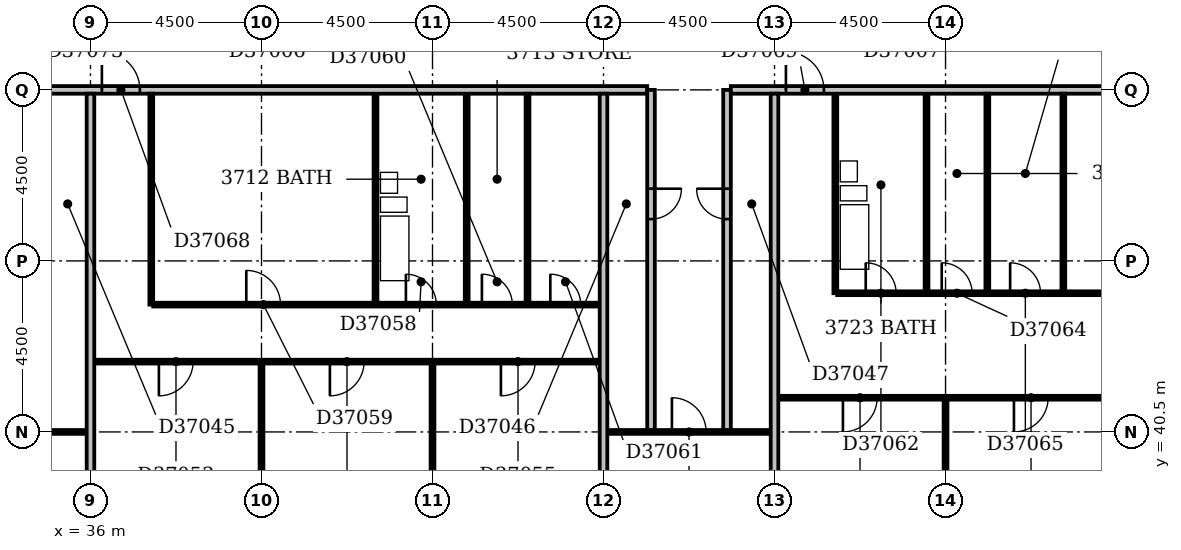
"""IFC4 building model, lengths in metres.
Left out: names, types, materials, properties, quantities, classifications, styles, units other than length and angle.
Written with IfcOpenShell. Run it as: python <this file> out.ifc"""

import sys

from ifc_helpers import new_model, si_unit, direction, frame, frame_2d, origin, place, context, subcontext, project, spatial, rectangle, extrude, element, fill, save


model = new_model("IFC4")
c1 = context("Model", 3, precision=1e-05, world=origin(), true_north=direction((0.0, 1.0)))
c2 = subcontext(c1, "Body", "Model", "MODEL_VIEW")
j1 = project(units=[si_unit("LENGTHUNIT", "METRE"), si_unit("PLANEANGLEUNIT", "RADIAN")], contexts=[c1])
p1 = place(None, origin())
s1 = spatial("IfcSite", under=j1, at=p1, CompositionType="ELEMENT")
p2 = place(p1, origin())
s2 = spatial("IfcBuilding", under=s1, at=p2, CompositionType="ELEMENT")
p3 = place(p2, frame((0.0, 0.0, 148.4)))
s3 = spatial("IfcBuildingStorey", under=s2, at=p3, CompositionType="ELEMENT", Elevation=148.4)
p4 = place(p3, frame((36.0, 36.5, 0.0), z_axis=(0.0, 0.0, 1.0), x_axis=(0.0, 1.0, 0.0)))
e1 = element("IfcWall", 1, at=p4, inside=s3, PredefinedType="PARTITIONING", context=c2, shape_type="SweptSolid", body=[
    extrude(rectangle(XDim=12.9, YDim=0.2, at=frame_2d((6.45, 0.0))), origin(), (0.0, 0.0, 1.0), 2.4),
])
p5 = place(p3, frame((40.5, 36.5, 0.0), z_axis=(0.0, 0.0, 1.0), x_axis=(0.0, 1.0, 0.0)))
e2 = element("IfcWall", 2, at=p5, inside=s3, PredefinedType="PARTITIONING", context=c2, shape_type="SweptSolid", body=[
    extrude(rectangle(XDim=5.8, YDim=0.1, at=frame_2d((2.9, 0.0))), origin(), (0.0, 0.0, 1.0), 3.3),
])
p6 = place(p3, frame((45.0, 36.5, 0.0), z_axis=(0.0, 0.0, 1.0), x_axis=(0.0, 1.0, 0.0)))
e3 = element("IfcWall", 3, at=p6, inside=s3, PredefinedType="PARTITIONING", context=c2, shape_type="SweptSolid", body=[
    extrude(rectangle(XDim=5.8, YDim=0.1, at=frame_2d((2.9, 0.0))), origin(), (0.0, 0.0, 1.0), 2.6),
])
p7 = place(p3, frame((49.5, 36.5, 0.0), z_axis=(0.0, 0.0, 1.0), x_axis=(0.0, 1.0, 0.0)))
e4 = element("IfcWall", 4, at=p7, inside=s3, PredefinedType="PARTITIONING", context=c2, shape_type="SweptSolid", body=[
    extrude(rectangle(XDim=12.9, YDim=0.2, at=frame_2d((6.45, 0.0))), origin(), (0.0, 0.0, 1.0), 3.3),
])
p8 = place(p3, frame((54.0, 36.5, 0.0), z_axis=(0.0, 0.0, 1.0), x_axis=(0.0, 1.0, 0.0)))
e5 = element("IfcWall", 5, at=p8, inside=s3, PredefinedType="PARTITIONING", context=c2, shape_type="SweptSolid", body=[
    extrude(rectangle(XDim=12.9, YDim=0.2, at=frame_2d((6.45, 0.0))), origin(), (0.0, 0.0, 1.0), 2.6),
])
p9 = place(p3, frame((58.5, 36.5, 0.0), z_axis=(0.0, 0.0, 1.0), x_axis=(0.0, 1.0, 0.0)))
e6 = element("IfcWall", 6, at=p9, inside=s3, PredefinedType="PARTITIONING", context=c2, shape_type="SweptSolid", body=[
    extrude(rectangle(XDim=4.85, YDim=0.1, at=frame_2d((2.425, 0.0))), origin(), (0.0, 0.0, 1.0), 3.3),
])
p10 = place(p3, frame((31.6, 40.5, 0.0), z_axis=(0.0, 0.0, 1.0), x_axis=(1.0, 0.0, 0.0)))
e7 = element("IfcWall", 7, at=p10, inside=s3, PredefinedType="PARTITIONING", context=c2, shape_type="SweptSolid", body=[
    extrude(rectangle(XDim=4.3, YDim=0.1, at=frame_2d((2.15, 0.0))), origin(), (0.0, 0.0, 1.0), 3.3),
])
p11 = place(p10, frame((1.7, 0.0, 0.0)))
e8 = element("IfcOpeningElement", 8, at=p11, cuts=e7, PredefinedType="OPENING", context=c2, shape_type="SweptSolid", body=[
    extrude(rectangle(XDim=0.9, YDim=2.1, at=frame_2d((0.45, 1.05))), frame((0.0, 0.062, 0.0), z_axis=(0.0, -1.0, 0.0), x_axis=(1.0, 0.0, 0.0)), (0.0, 0.0, 1.0), 0.124),
])
p12 = place(p3, frame((49.6, 40.5, 0.0), z_axis=(0.0, 0.0, 1.0), x_axis=(1.0, 0.0, 0.0)))
e9 = element("IfcWall", 9, at=p12, inside=s3, PredefinedType="PARTITIONING", context=c2, shape_type="SweptSolid", body=[
    extrude(rectangle(XDim=4.3, YDim=0.1, at=frame_2d((2.15, 0.0))), origin(), (0.0, 0.0, 1.0), 3.3),
])
p13 = place(p12, frame((1.7, 0.0, 0.0)))
e10 = element("IfcOpeningElement", 10, at=p13, cuts=e9, PredefinedType="OPENING", context=c2, shape_type="SweptSolid", body=[
    extrude(rectangle(XDim=0.9, YDim=2.1, at=frame_2d((0.45, 1.05))), frame((0.0, 0.062, 0.0), z_axis=(0.0, -1.0, 0.0), x_axis=(1.0, 0.0, 0.0)), (0.0, 0.0, 1.0), 0.124),
])
p14 = place(p3, frame((50.75, 40.55, 0.0), z_axis=(0.0, 0.0, 1.0), x_axis=(0.0, 1.0, 0.0)))
e11 = element("IfcWall", 11, at=p14, inside=s3, PredefinedType="PARTITIONING", context=c2, shape_type="SweptSolid", body=[
    extrude(rectangle(XDim=8.95, YDim=0.2, at=frame_2d((4.475, 0.0))), origin(), (0.0, 0.0, 1.0), 3.3),
])
p15 = place(p14, frame((5.55, 0.0, 0.0)))
e12 = element("IfcOpeningElement", 12, at=p15, cuts=e11, PredefinedType="OPENING", context=c2, shape_type="SweptSolid", body=[
    extrude(rectangle(XDim=0.8, YDim=2.1, at=frame_2d((0.4, 1.05))), frame((0.0, 0.112, 0.0), z_axis=(0.0, -1.0, 0.0), x_axis=(1.0, 0.0, 0.0)), (0.0, 0.0, 1.0), 0.224),
])
p16 = place(p3, frame((52.75, 40.55, 0.0), z_axis=(0.0, 0.0, 1.0), x_axis=(0.0, 1.0, 0.0)))
e13 = element("IfcWall", 13, at=p16, inside=s3, PredefinedType="PARTITIONING", context=c2, shape_type="SweptSolid", body=[
    extrude(rectangle(XDim=8.95, YDim=0.2, at=frame_2d((4.475, 0.0))), origin(), (0.0, 0.0, 1.0), 3.3),
])
p17 = place(p16, frame((5.55, 0.0, 0.0)))
e14 = element("IfcOpeningElement", 14, at=p17, cuts=e13, PredefinedType="OPENING", context=c2, shape_type="SweptSolid", body=[
    extrude(rectangle(XDim=0.8, YDim=2.1, at=frame_2d((0.4, 1.05))), frame((0.0, 0.112, 0.0), z_axis=(0.0, -1.0, 0.0), x_axis=(1.0, 0.0, 0.0)), (0.0, 0.0, 1.0), 0.224),
])
p18 = place(p3, frame((54.1, 41.4, 0.0), z_axis=(0.0, 0.0, 1.0), x_axis=(1.0, 0.0, 0.0)))
e15 = element("IfcWall", 15, at=p18, inside=s3, PredefinedType="PARTITIONING", context=c2, shape_type="SweptSolid", body=[
    extrude(rectangle(XDim=14.0, YDim=0.1, at=frame_2d((7.0, 0.0))), origin(), (0.0, 0.0, 1.0), 3.3),
])
p19 = place(p18, frame((1.7, 0.0, 0.0)))
e16 = element("IfcOpeningElement", 16, at=p19, cuts=e15, PredefinedType="OPENING", context=c2, shape_type="SweptSolid", body=[
    extrude(rectangle(XDim=0.9, YDim=2.1, at=frame_2d((0.45, 1.05))), frame((0.0, 0.062, 0.0), z_axis=(0.0, -1.0, 0.0), x_axis=(1.0, 0.0, 0.0)), (0.0, 0.0, 1.0), 0.124),
])
p20 = place(p18, frame((6.2, 0.0, 0.0)))
e17 = element("IfcOpeningElement", 17, at=p20, cuts=e15, PredefinedType="OPENING", context=c2, shape_type="SweptSolid", body=[
    extrude(rectangle(XDim=0.9, YDim=2.1, at=frame_2d((0.45, 1.05))), frame((0.0, 0.062, 0.0), z_axis=(0.0, -1.0, 0.0), x_axis=(1.0, 0.0, 0.0)), (0.0, 0.0, 1.0), 0.124),
])
p21 = place(p18, frame((10.7, 0.0, 0.0)))
e18 = element("IfcOpeningElement", 18, at=p21, cuts=e15, PredefinedType="OPENING", context=c2, shape_type="SweptSolid", body=[
    extrude(rectangle(XDim=0.9, YDim=2.1, at=frame_2d((0.45, 1.05))), frame((0.0, 0.062, 0.0), z_axis=(0.0, -1.0, 0.0), x_axis=(1.0, 0.0, 0.0)), (0.0, 0.0, 1.0), 0.124),
])
p22 = place(p3, frame((36.1, 42.35, 0.0), z_axis=(0.0, 0.0, 1.0), x_axis=(1.0, 0.0, 0.0)))
e19 = element("IfcWall", 19, at=p22, inside=s3, PredefinedType="PARTITIONING", context=c2, shape_type="SweptSolid", body=[
    extrude(rectangle(XDim=13.3, YDim=0.1, at=frame_2d((6.65, 0.0))), origin(), (0.0, 0.0, 1.0), 3.3),
])
p23 = place(p22, frame((1.7, 0.0, 0.0)))
e20 = element("IfcOpeningElement", 20, at=p23, cuts=e19, PredefinedType="OPENING", context=c2, shape_type="SweptSolid", body=[
    extrude(rectangle(XDim=0.9, YDim=2.1, at=frame_2d((0.45, 1.05))), frame((0.0, 0.062, 0.0), z_axis=(0.0, -1.0, 0.0), x_axis=(1.0, 0.0, 0.0)), (0.0, 0.0, 1.0), 0.124),
])
p24 = place(p22, frame((6.2, 0.0, 0.0)))
e21 = element("IfcOpeningElement", 21, at=p24, cuts=e19, PredefinedType="OPENING", context=c2, shape_type="SweptSolid", body=[
    extrude(rectangle(XDim=0.9, YDim=2.1, at=frame_2d((0.45, 1.05))), frame((0.0, 0.062, 0.0), z_axis=(0.0, -1.0, 0.0), x_axis=(1.0, 0.0, 0.0)), (0.0, 0.0, 1.0), 0.124),
])
p25 = place(p22, frame((10.7, 0.0, 0.0)))
e22 = element("IfcOpeningElement", 22, at=p25, cuts=e19, PredefinedType="OPENING", context=c2, shape_type="SweptSolid", body=[
    extrude(rectangle(XDim=0.9, YDim=2.1, at=frame_2d((0.45, 1.05))), frame((0.0, 0.062, 0.0), z_axis=(0.0, -1.0, 0.0), x_axis=(1.0, 0.0, 0.0)), (0.0, 0.0, 1.0), 0.124),
])
p26 = place(p3, frame((37.6, 43.85, 0.0), z_axis=(0.0, 0.0, 1.0), x_axis=(0.0, 1.0, 0.0)))
e23 = element("IfcWall", 23, at=p26, inside=s3, PredefinedType="PARTITIONING", context=c2, shape_type="SweptSolid", body=[
    extrude(rectangle(XDim=5.55, YDim=0.1, at=frame_2d((2.775, 0.0))), origin(), (0.0, 0.0, 1.0), 3.3),
])
p27 = place(p3, frame((37.65, 43.85, 0.0), z_axis=(0.0, 0.0, 1.0), x_axis=(1.0, 0.0, 0.0)))
e24 = element("IfcWall", 24, at=p27, inside=s3, PredefinedType="PARTITIONING", context=c2, shape_type="SweptSolid", body=[
    extrude(rectangle(XDim=11.75, YDim=0.1, at=frame_2d((5.875, 0.0))), origin(), (0.0, 0.0, 1.0), 3.3),
])
p28 = place(p27, frame((6.65, 0.0, 0.0)))
e25 = element("IfcOpeningElement", 25, at=p28, cuts=e24, PredefinedType="OPENING", context=c2, shape_type="SweptSolid", body=[
    extrude(rectangle(XDim=0.8, YDim=2.1, at=frame_2d((0.4, 1.05))), frame((0.0, 0.062, 0.0), z_axis=(0.0, -1.0, 0.0), x_axis=(1.0, 0.0, 0.0)), (0.0, 0.0, 1.0), 0.124),
])
p29 = place(p27, frame((2.45, 0.0, 0.0)))
e26 = element("IfcOpeningElement", 26, at=p29, cuts=e24, PredefinedType="OPENING", context=c2, shape_type="SweptSolid", body=[
    extrude(rectangle(XDim=0.9, YDim=2.1, at=frame_2d((0.45, 1.05))), frame((0.0, 0.062, 0.0), z_axis=(0.0, -1.0, 0.0), x_axis=(1.0, 0.0, 0.0)), (0.0, 0.0, 1.0), 0.124),
])
p30 = place(p27, frame((8.65, 0.0, 0.0)))
e27 = element("IfcOpeningElement", 27, at=p30, cuts=e24, PredefinedType="OPENING", context=c2, shape_type="SweptSolid", body=[
    extrude(rectangle(XDim=0.8, YDim=2.1, at=frame_2d((0.4, 1.05))), frame((0.0, 0.062, 0.0), z_axis=(0.0, -1.0, 0.0), x_axis=(1.0, 0.0, 0.0)), (0.0, 0.0, 1.0), 0.124),
])
p31 = place(p27, frame((10.45, 0.0, 0.0)))
e28 = element("IfcOpeningElement", 28, at=p31, cuts=e24, PredefinedType="OPENING", context=c2, shape_type="SweptSolid", body=[
    extrude(rectangle(XDim=0.8, YDim=2.1, at=frame_2d((0.4, 1.05))), frame((0.0, 0.062, 0.0), z_axis=(0.0, -1.0, 0.0), x_axis=(1.0, 0.0, 0.0)), (0.0, 0.0, 1.0), 0.124),
])
for number, where, z_axis, x_axis in (
    (29, (43.5, 43.9, 0.0), (0.0, 0.0, 1.0), (0.0, 1.0, 0.0)),
    (30, (45.9, 43.9, 0.0), (0.0, 0.0, 1.0), (0.0, 1.0, 0.0)),
):
    element("IfcWall", number, at=place(p3, frame(where, z_axis=z_axis, x_axis=x_axis)), inside=s3, PredefinedType="PLUMBINGWALL", context=c2, shape_type="SweptSolid", body=[
        extrude(rectangle(XDim=5.5, YDim=0.1, at=frame_2d((2.75, 0.0))), origin(), (0.0, 0.0, 1.0), 3.3),
    ])
p32 = place(p3, frame((47.5, 43.9, 0.0), z_axis=(0.0, 0.0, 1.0), x_axis=(0.0, 1.0, 0.0)))
e31 = element("IfcWall", 31, at=p32, inside=s3, PredefinedType="PARTITIONING", context=c2, shape_type="SweptSolid", body=[
    extrude(rectangle(XDim=5.5, YDim=0.1, at=frame_2d((2.75, 0.0))), origin(), (0.0, 0.0, 1.0), 3.3),
])
p33 = place(p3, frame((55.6, 44.15, 0.0), z_axis=(0.0, 0.0, 1.0), x_axis=(0.0, 1.0, 0.0)))
e32 = element("IfcWall", 32, at=p33, inside=s3, PredefinedType="PLUMBINGWALL", context=c2, shape_type="SweptSolid", body=[
    extrude(rectangle(XDim=5.25, YDim=0.1, at=frame_2d((2.625, 0.0))), origin(), (0.0, 0.0, 1.0), 3.3),
])
p34 = place(p3, frame((55.65, 44.15, 0.0), z_axis=(0.0, 0.0, 1.0), x_axis=(1.0, 0.0, 0.0)))
e33 = element("IfcWall", 33, at=p34, inside=s3, PredefinedType="PARTITIONING", context=c2, shape_type="SweptSolid", body=[
    extrude(rectangle(XDim=12.45, YDim=0.1, at=frame_2d((6.225, 0.0))), origin(), (0.0, 0.0, 1.0), 3.3),
])
p35 = place(p34, frame((0.75, 0.0, 0.0)))
e34 = element("IfcOpeningElement", 34, at=p35, cuts=e33, PredefinedType="OPENING", context=c2, shape_type="SweptSolid", body=[
    extrude(rectangle(XDim=0.8, YDim=2.1, at=frame_2d((0.4, 1.05))), frame((0.0, 0.062, 0.0), z_axis=(0.0, -1.0, 0.0), x_axis=(1.0, 0.0, 0.0)), (0.0, 0.0, 1.0), 0.124),
])
p36 = place(p34, frame((8.45, 0.0, 0.0)))
e35 = element("IfcOpeningElement", 35, at=p36, cuts=e33, PredefinedType="OPENING", context=c2, shape_type="SweptSolid", body=[
    extrude(rectangle(XDim=0.9, YDim=2.1, at=frame_2d((0.45, 1.05))), frame((0.0, 0.062, 0.0), z_axis=(0.0, -1.0, 0.0), x_axis=(1.0, 0.0, 0.0)), (0.0, 0.0, 1.0), 0.124),
])
p37 = place(p34, frame((2.75, 0.0, 0.0)))
e36 = element("IfcOpeningElement", 36, at=p37, cuts=e33, PredefinedType="OPENING", context=c2, shape_type="SweptSolid", body=[
    extrude(rectangle(XDim=0.8, YDim=2.1, at=frame_2d((0.4, 1.05))), frame((0.0, 0.062, 0.0), z_axis=(0.0, -1.0, 0.0), x_axis=(1.0, 0.0, 0.0)), (0.0, 0.0, 1.0), 0.124),
])
p38 = place(p34, frame((4.55, 0.0, 0.0)))
e37 = element("IfcOpeningElement", 37, at=p38, cuts=e33, PredefinedType="OPENING", context=c2, shape_type="SweptSolid", body=[
    extrude(rectangle(XDim=0.8, YDim=2.1, at=frame_2d((0.4, 1.05))), frame((0.0, 0.062, 0.0), z_axis=(0.0, -1.0, 0.0), x_axis=(1.0, 0.0, 0.0)), (0.0, 0.0, 1.0), 0.124),
])
p39 = place(p3, frame((58.0, 44.2, 0.0), z_axis=(0.0, 0.0, 1.0), x_axis=(0.0, 1.0, 0.0)))
e38 = element("IfcWall", 38, at=p39, inside=s3, PredefinedType="PLUMBINGWALL", context=c2, shape_type="SweptSolid", body=[
    extrude(rectangle(XDim=5.2, YDim=0.1, at=frame_2d((2.6, 0.0))), origin(), (0.0, 0.0, 1.0), 3.3),
])
for number, where, z_axis, x_axis in (
    (39, (59.6, 44.2, 0.0), (0.0, 0.0, 1.0), (0.0, 1.0, 0.0)),
    (40, (61.6, 44.2, 0.0), (0.0, 0.0, 1.0), (0.0, 1.0, 0.0)),
):
    element("IfcWall", number, at=place(p3, frame(where, z_axis=z_axis, x_axis=x_axis)), inside=s3, PredefinedType="PARTITIONING", context=c2, shape_type="SweptSolid", body=[
        extrude(rectangle(XDim=5.2, YDim=0.1, at=frame_2d((2.6, 0.0))), origin(), (0.0, 0.0, 1.0), 3.3),
    ])
p40 = place(p3, frame((34.85, 49.5, 0.0), z_axis=(0.0, 0.0, 1.0), x_axis=(1.0, 0.0, 0.0)))
e41 = element("IfcWall", 41, at=p40, inside=s3, PredefinedType="PARTITIONING", context=c2, shape_type="SweptSolid", body=[
    extrude(rectangle(XDim=15.8, YDim=0.2, at=frame_2d((7.9, 0.0))), origin(), (0.0, 0.0, 1.0), 3.3),
])
p41 = place(p40, frame((1.45, 0.0, 0.0)))
e42 = element("IfcOpeningElement", 42, at=p41, cuts=e41, PredefinedType="OPENING", context=c2, shape_type="SweptSolid", body=[
    extrude(rectangle(XDim=1.0, YDim=2.1, at=frame_2d((0.5, 1.05))), frame((0.0, 0.112, 0.0), z_axis=(0.0, -1.0, 0.0), x_axis=(1.0, 0.0, 0.0)), (0.0, 0.0, 1.0), 0.224),
])
p42 = place(p3, frame((52.85, 49.5, 0.0), z_axis=(0.0, 0.0, 1.0), x_axis=(1.0, 0.0, 0.0)))
e43 = element("IfcWall", 43, at=p42, inside=s3, PredefinedType="PARTITIONING", context=c2, shape_type="SweptSolid", body=[
    extrude(rectangle(XDim=14.15, YDim=0.2, at=frame_2d((7.075, 0.0))), origin(), (0.0, 0.0, 1.0), 3.3),
])
p43 = place(p42, frame((1.45, 0.0, 0.0)))
e44 = element("IfcOpeningElement", 44, at=p43, cuts=e43, PredefinedType="OPENING", context=c2, shape_type="SweptSolid", body=[
    extrude(rectangle(XDim=1.0, YDim=2.1, at=frame_2d((0.5, 1.05))), frame((0.0, 0.112, 0.0), z_axis=(0.0, -1.0, 0.0), x_axis=(1.0, 0.0, 0.0)), (0.0, 0.0, 1.0), 0.224),
])
p44 = place(p13, origin())
e45 = element("IfcDoor", 45, at=p44, inside=s3, OperationType="SINGLE_SWING_LEFT", PredefinedType="DOOR", context=c2, shape_type="SweptSolid", body=[
    extrude(rectangle(XDim=0.9, YDim=2.1, at=frame_2d((0.45, 1.05))), frame((0.0, 0.025, 0.0), z_axis=(0.0, -1.0, 0.0), x_axis=(1.0, 0.0, 0.0)), (0.0, 0.0, 1.0), 0.05),
])
fill(e10, e45)
p45 = place(p15, origin())
e46 = element("IfcDoor", 46, at=p45, inside=s3, OperationType="SINGLE_SWING_RIGHT", PredefinedType="DOOR", context=c2, shape_type="SweptSolid", body=[
    extrude(rectangle(XDim=0.8, YDim=2.1, at=frame_2d((0.4, 1.05))), frame((0.0, 0.025, 0.0), z_axis=(0.0, -1.0, 0.0), x_axis=(1.0, 0.0, 0.0)), (0.0, 0.0, 1.0), 0.05),
])
fill(e12, e46)
p46 = place(p17, frame((0.8, 0.0, 0.0), z_axis=(0.0, 0.0, 1.0), x_axis=(-1.0, 0.0, 0.0)))
e47 = element("IfcDoor", 47, at=p46, inside=s3, OperationType="SINGLE_SWING_LEFT", PredefinedType="DOOR", context=c2, shape_type="SweptSolid", body=[
    extrude(rectangle(XDim=0.8, YDim=2.1, at=frame_2d((0.4, 1.05))), frame((0.0, 0.025, 0.0), z_axis=(0.0, -1.0, 0.0), x_axis=(1.0, 0.0, 0.0)), (0.0, 0.0, 1.0), 0.05),
])
fill(e14, e47)
p47 = place(p19, frame((0.9, 0.0, 0.0), z_axis=(0.0, 0.0, 1.0), x_axis=(-1.0, 0.0, 0.0)))
e48 = element("IfcDoor", 48, at=p47, inside=s3, OperationType="SINGLE_SWING_RIGHT", PredefinedType="DOOR", context=c2, shape_type="SweptSolid", body=[
    extrude(rectangle(XDim=0.9, YDim=2.1, at=frame_2d((0.45, 1.05))), frame((0.0, 0.025, 0.0), z_axis=(0.0, -1.0, 0.0), x_axis=(1.0, 0.0, 0.0)), (0.0, 0.0, 1.0), 0.05),
])
fill(e16, e48)
p48 = place(p20, frame((0.9, 0.0, 0.0), z_axis=(0.0, 0.0, 1.0), x_axis=(-1.0, 0.0, 0.0)))
e49 = element("IfcDoor", 49, at=p48, inside=s3, OperationType="SINGLE_SWING_RIGHT", PredefinedType="DOOR", context=c2, shape_type="SweptSolid", body=[
    extrude(rectangle(XDim=0.9, YDim=2.1, at=frame_2d((0.45, 1.05))), frame((0.0, 0.025, 0.0), z_axis=(0.0, -1.0, 0.0), x_axis=(1.0, 0.0, 0.0)), (0.0, 0.0, 1.0), 0.05),
])
fill(e17, e49)
p49 = place(p23, frame((0.9, 0.0, 0.0), z_axis=(0.0, 0.0, 1.0), x_axis=(-1.0, 0.0, 0.0)))
e50 = element("IfcDoor", 50, at=p49, inside=s3, OperationType="SINGLE_SWING_RIGHT", PredefinedType="DOOR", context=c2, shape_type="SweptSolid", body=[
    extrude(rectangle(XDim=0.9, YDim=2.1, at=frame_2d((0.45, 1.05))), frame((0.0, 0.025, 0.0), z_axis=(0.0, -1.0, 0.0), x_axis=(1.0, 0.0, 0.0)), (0.0, 0.0, 1.0), 0.05),
])
fill(e20, e50)
p50 = place(p24, frame((0.9, 0.0, 0.0), z_axis=(0.0, 0.0, 1.0), x_axis=(-1.0, 0.0, 0.0)))
e51 = element("IfcDoor", 51, at=p50, inside=s3, OperationType="SINGLE_SWING_RIGHT", PredefinedType="DOOR", context=c2, shape_type="SweptSolid", body=[
    extrude(rectangle(XDim=0.9, YDim=2.1, at=frame_2d((0.45, 1.05))), frame((0.0, 0.025, 0.0), z_axis=(0.0, -1.0, 0.0), x_axis=(1.0, 0.0, 0.0)), (0.0, 0.0, 1.0), 0.05),
])
fill(e21, e51)
p51 = place(p25, frame((0.9, 0.0, 0.0), z_axis=(0.0, 0.0, 1.0), x_axis=(-1.0, 0.0, 0.0)))
e52 = element("IfcDoor", 52, at=p51, inside=s3, OperationType="SINGLE_SWING_RIGHT", PredefinedType="DOOR", context=c2, shape_type="SweptSolid", body=[
    extrude(rectangle(XDim=0.9, YDim=2.1, at=frame_2d((0.45, 1.05))), frame((0.0, 0.025, 0.0), z_axis=(0.0, -1.0, 0.0), x_axis=(1.0, 0.0, 0.0)), (0.0, 0.0, 1.0), 0.05),
])
fill(e22, e52)
p52 = place(p28, origin())
e53 = element("IfcDoor", 53, at=p52, inside=s3, OperationType="SINGLE_SWING_LEFT", PredefinedType="DOOR", context=c2, shape_type="SweptSolid", body=[
    extrude(rectangle(XDim=0.8, YDim=2.1, at=frame_2d((0.4, 1.05))), frame((0.0, 0.025, 0.0), z_axis=(0.0, -1.0, 0.0), x_axis=(1.0, 0.0, 0.0)), (0.0, 0.0, 1.0), 0.05),
])
fill(e25, e53)
p53 = place(p29, origin())
e54 = element("IfcDoor", 54, at=p53, inside=s3, OperationType="SINGLE_SWING_LEFT", PredefinedType="DOOR", context=c2, shape_type="SweptSolid", body=[
    extrude(rectangle(XDim=0.9, YDim=2.1, at=frame_2d((0.45, 1.05))), frame((0.0, 0.025, 0.0), z_axis=(0.0, -1.0, 0.0), x_axis=(1.0, 0.0, 0.0)), (0.0, 0.0, 1.0), 0.05),
])
fill(e26, e54)
p54 = place(p30, origin())
e55 = element("IfcDoor", 55, at=p54, inside=s3, OperationType="SINGLE_SWING_LEFT", PredefinedType="DOOR", context=c2, shape_type="SweptSolid", body=[
    extrude(rectangle(XDim=0.8, YDim=2.1, at=frame_2d((0.4, 1.05))), frame((0.0, 0.025, 0.0), z_axis=(0.0, -1.0, 0.0), x_axis=(1.0, 0.0, 0.0)), (0.0, 0.0, 1.0), 0.05),
])
fill(e27, e55)
p55 = place(p31, origin())
e56 = element("IfcDoor", 56, at=p55, inside=s3, OperationType="SINGLE_SWING_LEFT", PredefinedType="DOOR", context=c2, shape_type="SweptSolid", body=[
    extrude(rectangle(XDim=0.8, YDim=2.1, at=frame_2d((0.4, 1.05))), frame((0.0, 0.025, 0.0), z_axis=(0.0, -1.0, 0.0), x_axis=(1.0, 0.0, 0.0)), (0.0, 0.0, 1.0), 0.05),
])
fill(e28, e56)
p56 = place(p35, origin())
e57 = element("IfcDoor", 57, at=p56, inside=s3, OperationType="SINGLE_SWING_LEFT", PredefinedType="DOOR", context=c2, shape_type="SweptSolid", body=[
    extrude(rectangle(XDim=0.8, YDim=2.1, at=frame_2d((0.4, 1.05))), frame((0.0, 0.025, 0.0), z_axis=(0.0, -1.0, 0.0), x_axis=(1.0, 0.0, 0.0)), (0.0, 0.0, 1.0), 0.05),
])
fill(e34, e57)
p57 = place(p37, origin())
e58 = element("IfcDoor", 58, at=p57, inside=s3, OperationType="SINGLE_SWING_LEFT", PredefinedType="DOOR", context=c2, shape_type="SweptSolid", body=[
    extrude(rectangle(XDim=0.8, YDim=2.1, at=frame_2d((0.4, 1.05))), frame((0.0, 0.025, 0.0), z_axis=(0.0, -1.0, 0.0), x_axis=(1.0, 0.0, 0.0)), (0.0, 0.0, 1.0), 0.05),
])
fill(e36, e58)
p58 = place(p38, origin())
e59 = element("IfcDoor", 59, at=p58, inside=s3, OperationType="SINGLE_SWING_LEFT", PredefinedType="DOOR", context=c2, shape_type="SweptSolid", body=[
    extrude(rectangle(XDim=0.8, YDim=2.1, at=frame_2d((0.4, 1.05))), frame((0.0, 0.025, 0.0), z_axis=(0.0, -1.0, 0.0), x_axis=(1.0, 0.0, 0.0)), (0.0, 0.0, 1.0), 0.05),
])
fill(e37, e59)
p59 = place(p41, origin())
e60 = element("IfcDoor", 60, at=p59, inside=s3, OperationType="SINGLE_SWING_LEFT", PredefinedType="DOOR", context=c2, shape_type="SweptSolid", body=[
    extrude(rectangle(XDim=1.0, YDim=2.1, at=frame_2d((0.5, 1.05))), frame((0.0, 0.025, 0.0), z_axis=(0.0, -1.0, 0.0), x_axis=(1.0, 0.0, 0.0)), (0.0, 0.0, 1.0), 0.05),
])
fill(e42, e60)
p60 = place(p43, origin())
e61 = element("IfcDoor", 61, at=p60, inside=s3, OperationType="SINGLE_SWING_LEFT", PredefinedType="DOOR", context=c2, shape_type="SweptSolid", body=[
    extrude(rectangle(XDim=1.0, YDim=2.1, at=frame_2d((0.5, 1.05))), frame((0.0, 0.025, 0.0), z_axis=(0.0, -1.0, 0.0), x_axis=(1.0, 0.0, 0.0)), (0.0, 0.0, 1.0), 0.05),
])
fill(e44, e61)
save(model, sys.argv[1])
